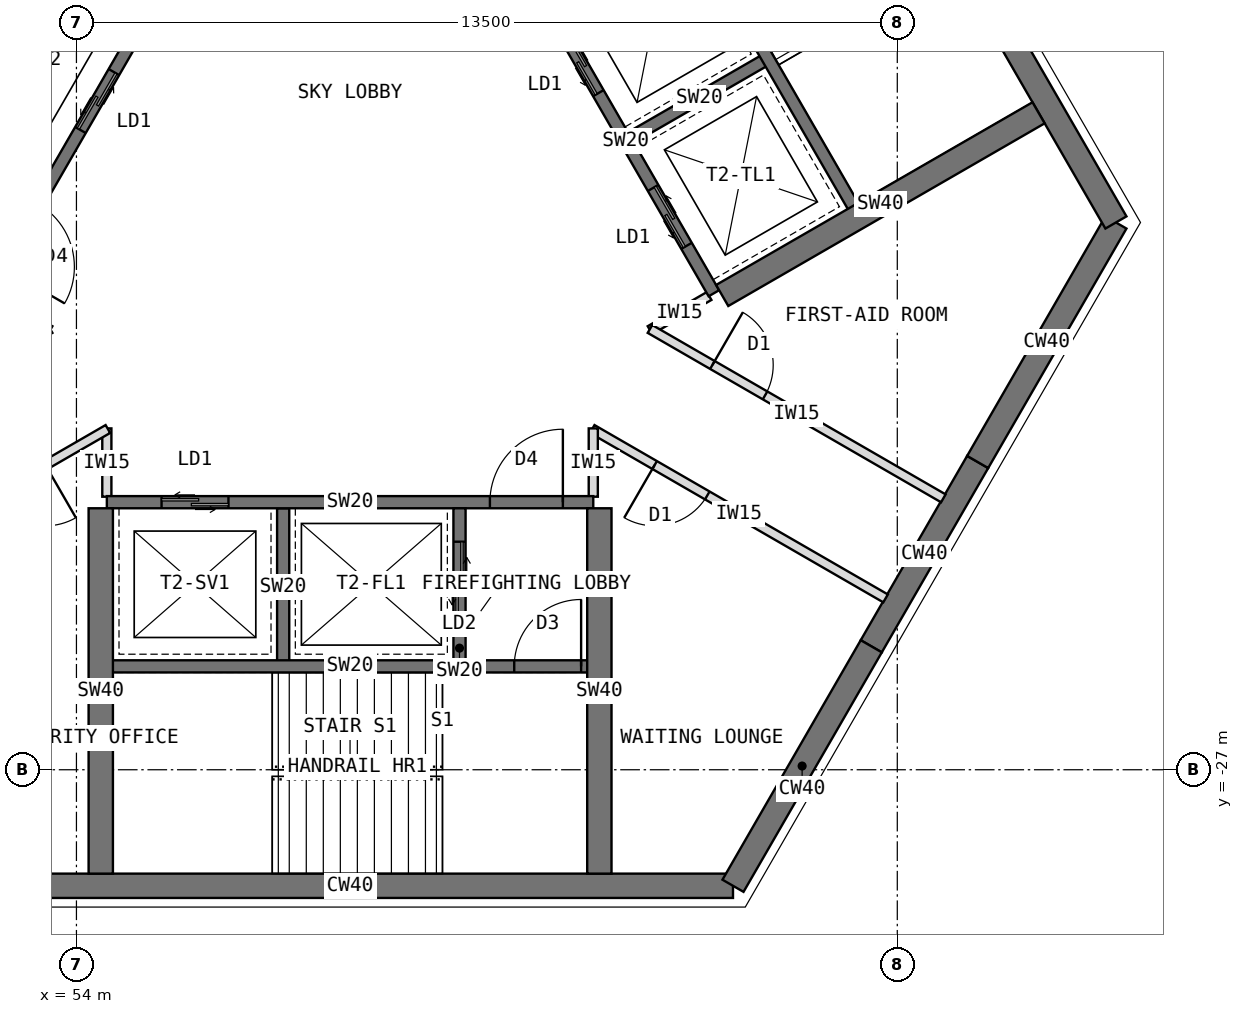
"""IFC4 building model, lengths in metres.
Left out: names, types, materials, properties, quantities, classifications, styles, units other than length and angle.
Written with IfcOpenShell. Run it as: python <this file> out.ifc"""

import sys

from ifc_helpers import new_model, si_unit, direction, frame, frame_2d, origin, place, context, subcontext, project, spatial, rectangle, extrude, element, fill, save


model = new_model("IFC4")
c1 = context("Model", 3, precision=1e-05, world=origin(), true_north=direction((0.0, 1.0)))
c2 = subcontext(c1, "Body", "Model", "MODEL_VIEW")
j1 = project(units=[si_unit("LENGTHUNIT", "METRE"), si_unit("PLANEANGLEUNIT", "RADIAN")], contexts=[c1])
p1 = place(None, origin())
s1 = spatial("IfcSite", under=j1, at=p1, CompositionType="ELEMENT")
p2 = place(p1, origin())
s2 = spatial("IfcBuilding", under=s1, at=p2, CompositionType="ELEMENT")
p3 = place(p2, frame((0.0, 0.0, 243.5)))
s3 = spatial("IfcBuildingStorey", under=s2, at=p3, CompositionType="ELEMENT", Elevation=243.5)
p4 = place(p3, frame((52.202, -28.908, 0.0), z_axis=(0.0, 0.0, 1.0), x_axis=(1.0, 0.0, 0.0)))
e1 = element("IfcWall", 1, at=p4, inside=s3, PredefinedType="SHEAR", context=c2, shape_type="SweptSolid", body=[
    extrude(rectangle(XDim=12.596, YDim=0.4, at=frame_2d((6.298, 0.0))), origin(), (0.0, 0.0, 1.0), 4.0),
])
p5 = place(p3, frame((64.798, -28.908, 0.0), z_axis=(0.0, 0.0, 1.0), x_axis=(0.499984222037, 0.866034513004, 0.0)))
e2 = element("IfcWall", 2, at=p5, inside=s3, PredefinedType="SHEAR", context=c2, shape_type="SweptSolid", body=[
    extrude(rectangle(XDim=4.548, YDim=0.4, at=frame_2d((2.274, 0.0))), origin(), (0.0, 0.0, 1.0), 4.0),
])
p6 = place(p3, frame((67.072, -24.97, 0.0), z_axis=(0.0, 0.0, 1.0), x_axis=(0.500010275428, 0.866019471182, 0.0)))
e3 = element("IfcWall", 3, at=p6, inside=s3, PredefinedType="SHEAR", context=c2, shape_type="SweptSolid", body=[
    extrude(rectangle(XDim=3.5, YDim=0.4, at=frame_2d((1.75, 0.0))), origin(), (0.0, 0.0, 1.0), 4.0),
])
p7 = place(p3, frame((68.822, -21.939, 0.0), z_axis=(0.0, 0.0, 1.0), x_axis=(0.500024481964, 0.866011268655, 0.0)))
e4 = element("IfcWall", 4, at=p7, inside=s3, PredefinedType="SHEAR", context=c2, shape_type="SweptSolid", body=[
    extrude(rectangle(XDim=4.548, YDim=0.4, at=frame_2d((2.274, 0.0))), origin(), (0.0, 0.0, 1.0), 4.0),
])
p8 = place(p3, frame((71.096, -18.0, 0.0), z_axis=(0.0, 0.0, 1.0), x_axis=(-0.500005998175, 0.866021940709, 0.0)))
e5 = element("IfcWall", 5, at=p8, inside=s3, PredefinedType="SHEAR", context=c2, shape_type="SweptSolid", body=[
    extrude(rectangle(XDim=12.596, YDim=0.4, at=frame_2d((6.298, 0.0))), origin(), (0.0, 0.0, 1.0), 4.0),
])
p9 = place(p3, frame((56.516, -12.236, 0.0), z_axis=(0.0, 0.0, 1.0), x_axis=(-0.49999894854, -0.866026010844, 0.0)))
e6 = element("IfcWall", 6, at=p9, inside=s3, PredefinedType="SHEAR", context=c2, shape_type="SweptSolid", body=[
    extrude(rectangle(XDim=8.0, YDim=0.2, at=frame_2d((4.0, 0.0))), origin(), (0.0, 0.0, 1.0), 4.0),
])
p10 = place(p9, frame((6.3, 0.0, 0.0)))
e7 = element("IfcOpeningElement", 7, at=p10, cuts=e6, PredefinedType="OPENING", context=c2, shape_type="SweptSolid", body=[
    extrude(rectangle(XDim=1.2, YDim=2.1, at=frame_2d((0.6, 1.05))), frame((0.0, 0.11, 0.0), z_axis=(0.0, -1.0, 0.0), x_axis=(1.0, 0.0, 0.0)), (0.0, 0.0, 1.0), 0.22),
])
p11 = place(p9, frame((0.9, 0.0, 0.0)))
e8 = element("IfcOpeningElement", 8, at=p11, cuts=e6, PredefinedType="OPENING", context=c2, shape_type="SweptSolid", body=[
    extrude(rectangle(XDim=1.1, YDim=2.2, at=frame_2d((0.55, 1.1))), frame((0.0, 0.11, 0.0), z_axis=(0.0, -1.0, 0.0), x_axis=(1.0, 0.0, 0.0)), (0.0, 0.0, 1.0), 0.22),
])
p12 = place(p9, frame((3.8, 0.0, 0.0)))
e9 = element("IfcOpeningElement", 9, at=p12, cuts=e6, PredefinedType="OPENING", context=c2, shape_type="SweptSolid", body=[
    extrude(rectangle(XDim=1.1, YDim=2.2, at=frame_2d((0.55, 1.1))), frame((0.0, 0.11, 0.0), z_axis=(0.0, -1.0, 0.0), x_axis=(1.0, 0.0, 0.0)), (0.0, 0.0, 1.0), 0.22),
])
p13 = place(p3, frame((54.178, -10.886, 0.0), z_axis=(0.0, 0.0, 1.0), x_axis=(-0.49999894854, -0.866026010844, 0.0)))
e10 = element("IfcWall", 10, at=p13, inside=s3, PredefinedType="SHEAR", context=c2, shape_type="SweptSolid", body=[
    extrude(rectangle(XDim=8.0, YDim=0.2, at=frame_2d((4.0, 0.0))), origin(), (0.0, 0.0, 1.0), 4.0),
])
p14 = place(p13, frame((6.8, 0.0, 0.0)))
e11 = element("IfcOpeningElement", 11, at=p14, cuts=e10, PredefinedType="OPENING", context=c2, shape_type="SweptSolid", body=[
    extrude(rectangle(XDim=0.9, YDim=2.1, at=frame_2d((0.45, 1.05))), frame((0.0, 0.11, 0.0), z_axis=(0.0, -1.0, 0.0), x_axis=(1.0, 0.0, 0.0)), (0.0, 0.0, 1.0), 0.22),
])
p15 = place(p3, frame((54.5, -22.6, 0.0), z_axis=(0.0, 0.0, 1.0), x_axis=(1.0, 0.0, 0.0)))
e12 = element("IfcWall", 12, at=p15, inside=s3, PredefinedType="SHEAR", context=c2, shape_type="SweptSolid", body=[
    extrude(rectangle(XDim=8.0, YDim=0.2, at=frame_2d((4.0, 0.0))), origin(), (0.0, 0.0, 1.0), 4.0),
])
p16 = place(p15, frame((6.3, 0.0, 0.0)))
e13 = element("IfcOpeningElement", 13, at=p16, cuts=e12, PredefinedType="OPENING", context=c2, shape_type="SweptSolid", body=[
    extrude(rectangle(XDim=1.2, YDim=2.1, at=frame_2d((0.6, 1.05))), frame((0.0, 0.11, 0.0), z_axis=(0.0, -1.0, 0.0), x_axis=(1.0, 0.0, 0.0)), (0.0, 0.0, 1.0), 0.22),
])
p17 = place(p15, frame((0.9, 0.0, 0.0)))
e14 = element("IfcOpeningElement", 14, at=p17, cuts=e12, PredefinedType="OPENING", context=c2, shape_type="SweptSolid", body=[
    extrude(rectangle(XDim=1.1, YDim=2.2, at=frame_2d((0.55, 1.1))), frame((0.0, 0.11, 0.0), z_axis=(0.0, -1.0, 0.0), x_axis=(1.0, 0.0, 0.0)), (0.0, 0.0, 1.0), 0.22),
])
p18 = place(p3, frame((57.4, -22.7, 0.0), z_axis=(0.0, 0.0, 1.0), x_axis=(0.0, -1.0, 0.0)))
e15 = element("IfcWall", 15, at=p18, inside=s3, PredefinedType="SHEAR", context=c2, shape_type="SweptSolid", body=[
    extrude(rectangle(XDim=2.6, YDim=0.2, at=frame_2d((1.3, 0.0))), origin(), (0.0, 0.0, 1.0), 4.0),
])
p19 = place(p3, frame((60.3, -22.7, 0.0), z_axis=(0.0, 0.0, 1.0), x_axis=(0.0, -1.0, 0.0)))
e16 = element("IfcWall", 16, at=p19, inside=s3, PredefinedType="SHEAR", context=c2, shape_type="SweptSolid", body=[
    extrude(rectangle(XDim=2.6, YDim=0.2, at=frame_2d((1.3, 0.0))), origin(), (0.0, 0.0, 1.0), 4.0),
])
p20 = place(p19, frame((0.55, 0.0, 0.0)))
e17 = element("IfcOpeningElement", 17, at=p20, cuts=e16, PredefinedType="OPENING", context=c2, shape_type="SweptSolid", body=[
    extrude(rectangle(XDim=1.3, YDim=2.2, at=frame_2d((0.65, 1.1))), frame((0.0, 0.11, 0.0), z_axis=(0.0, -1.0, 0.0), x_axis=(1.0, 0.0, 0.0)), (0.0, 0.0, 1.0), 0.22),
])
p21 = place(p3, frame((54.5, -25.3, 0.0), z_axis=(0.0, 0.0, 1.0), x_axis=(1.0, 0.0, 0.0)))
e18 = element("IfcWall", 18, at=p21, inside=s3, PredefinedType="SHEAR", context=c2, shape_type="SweptSolid", body=[
    extrude(rectangle(XDim=8.0, YDim=0.2, at=frame_2d((4.0, 0.0))), origin(), (0.0, 0.0, 1.0), 4.0),
])
p22 = place(p21, frame((6.7, 0.0, 0.0)))
e19 = element("IfcOpeningElement", 19, at=p22, cuts=e18, PredefinedType="OPENING", context=c2, shape_type="SweptSolid", body=[
    extrude(rectangle(XDim=1.1, YDim=2.1, at=frame_2d((0.55, 1.05))), frame((0.0, 0.11, 0.0), z_axis=(0.0, -1.0, 0.0), x_axis=(1.0, 0.0, 0.0)), (0.0, 0.0, 1.0), 0.22),
])
for number, where, z_axis, x_axis in (
    (20, (62.6, -22.7, 0.0), (0.0, 0.0, 1.0), (0.0, -1.0, 0.0)),
    (21, (54.4, -22.7, 0.0), (0.0, 0.0, 1.0), (0.0, -1.0, 0.0)),
):
    element("IfcWall", number, at=place(p3, frame(where, z_axis=z_axis, x_axis=x_axis)), inside=s3, PredefinedType="SHEAR", context=c2, shape_type="SweptSolid", body=[
        extrude(rectangle(XDim=6.008, YDim=0.4, at=frame_2d((3.004, 0.0))), origin(), (0.0, 0.0, 1.0), 4.0),
    ])
p23 = place(p3, frame((64.484, -19.164, 0.0), z_axis=(0.0, 0.0, 1.0), x_axis=(-0.49999894854, 0.866026010844, 0.0)))
e22 = element("IfcWall", 22, at=p23, inside=s3, PredefinedType="SHEAR", context=c2, shape_type="SweptSolid", body=[
    extrude(rectangle(XDim=8.0, YDim=0.2, at=frame_2d((4.0, 0.0))), origin(), (0.0, 0.0, 1.0), 4.0),
])
p24 = place(p23, frame((6.3, 0.0, 0.0)))
e23 = element("IfcOpeningElement", 23, at=p24, cuts=e22, PredefinedType="OPENING", context=c2, shape_type="SweptSolid", body=[
    extrude(rectangle(XDim=1.2, YDim=2.1, at=frame_2d((0.6, 1.05))), frame((0.0, 0.11, 0.0), z_axis=(0.0, -1.0, 0.0), x_axis=(1.0, 0.0, 0.0)), (0.0, 0.0, 1.0), 0.22),
])
p25 = place(p23, frame((0.9, 0.0, 0.0)))
e24 = element("IfcOpeningElement", 24, at=p25, cuts=e22, PredefinedType="OPENING", context=c2, shape_type="SweptSolid", body=[
    extrude(rectangle(XDim=1.1, YDim=2.2, at=frame_2d((0.55, 1.1))), frame((0.0, 0.11, 0.0), z_axis=(0.0, -1.0, 0.0), x_axis=(1.0, 0.0, 0.0)), (0.0, 0.0, 1.0), 0.22),
])
p26 = place(p23, frame((3.8, 0.0, 0.0)))
e25 = element("IfcOpeningElement", 25, at=p26, cuts=e22, PredefinedType="OPENING", context=c2, shape_type="SweptSolid", body=[
    extrude(rectangle(XDim=1.1, YDim=2.2, at=frame_2d((0.55, 1.1))), frame((0.0, 0.11, 0.0), z_axis=(0.0, -1.0, 0.0), x_axis=(1.0, 0.0, 0.0)), (0.0, 0.0, 1.0), 0.22),
])
p27 = place(p3, frame((63.12, -16.603, 0.0), z_axis=(0.0, 0.0, 1.0), x_axis=(0.866062058628, 0.499936506574, 0.0)))
e26 = element("IfcWall", 26, at=p27, inside=s3, PredefinedType="SHEAR", context=c2, shape_type="SweptSolid", body=[
    extrude(rectangle(XDim=2.6, YDim=0.2, at=frame_2d((1.3, 0.0))), origin(), (0.0, 0.0, 1.0), 4.0),
])
p28 = place(p3, frame((66.822, -17.814, 0.0), z_axis=(0.0, 0.0, 1.0), x_axis=(-0.49999894854, 0.866026010844, 0.0)))
e27 = element("IfcWall", 27, at=p28, inside=s3, PredefinedType="SHEAR", context=c2, shape_type="SweptSolid", body=[
    extrude(rectangle(XDim=8.0, YDim=0.2, at=frame_2d((4.0, 0.0))), origin(), (0.0, 0.0, 1.0), 4.0),
])
p29 = place(p28, frame((6.7, 0.0, 0.0)))
e28 = element("IfcOpeningElement", 28, at=p29, cuts=e27, PredefinedType="OPENING", context=c2, shape_type="SweptSolid", body=[
    extrude(rectangle(XDim=1.1, YDim=2.1, at=frame_2d((0.55, 1.05))), frame((0.0, 0.11, 0.0), z_axis=(0.0, -1.0, 0.0), x_axis=(1.0, 0.0, 0.0)), (0.0, 0.0, 1.0), 0.22),
])
p30 = place(p3, frame((64.62, -19.201, 0.0), z_axis=(0.0, 0.0, 1.0), x_axis=(0.866026570101, 0.499997979876, 0.0)))
e29 = element("IfcWall", 29, at=p30, inside=s3, PredefinedType="SHEAR", context=c2, shape_type="SweptSolid", body=[
    extrude(rectangle(XDim=6.008, YDim=0.4, at=frame_2d((3.004, 0.0))), origin(), (0.0, 0.0, 1.0), 4.0),
])
p31 = place(p3, frame((54.5, -22.51, 0.0), z_axis=(0.0, 0.0, 1.0), x_axis=(0.0, 1.0, 0.0)))
e30 = element("IfcWall", 30, at=p31, inside=s3, PredefinedType="PARTITIONING", context=c2, shape_type="SweptSolid", body=[
    extrude(rectangle(XDim=1.124, YDim=0.15, at=frame_2d((0.562, 0.0))), origin(), (0.0, 0.0, 1.0), 3.8),
])
p32 = place(p3, frame((54.517, -21.396, 0.0), z_axis=(0.0, 0.0, 1.0), x_axis=(-0.866036713669, -0.499980410194, 0.0)))
e31 = element("IfcWall", 31, at=p32, inside=s3, PredefinedType="PARTITIONING", context=c2, shape_type="SweptSolid", body=[
    extrude(rectangle(XDim=5.571, YDim=0.15, at=frame_2d((2.786, 0.0))), origin(), (0.0, 0.0, 1.0), 3.8),
])
p33 = place(p32, frame((1.186, 0.0, 0.0)))
e32 = element("IfcOpeningElement", 32, at=p33, cuts=e31, PredefinedType="OPENING", context=c2, shape_type="SweptSolid", body=[
    extrude(rectangle(XDim=1.0, YDim=2.1, at=frame_2d((0.5, 1.05))), frame((0.0, 0.085, 0.0), z_axis=(0.0, -1.0, 0.0), x_axis=(1.0, 0.0, 0.0)), (0.0, 0.0, 1.0), 0.17),
])
p34 = place(p3, frame((48.743, -22.536, 0.0), z_axis=(0.0, 0.0, 1.0), x_axis=(0.866036713669, 0.499980410194, 0.0)))
e33 = element("IfcWall", 33, at=p34, inside=s3, PredefinedType="PARTITIONING", context=c2, shape_type="SweptSolid", body=[
    extrude(rectangle(XDim=5.571, YDim=0.15, at=frame_2d((2.786, 0.0))), origin(), (0.0, 0.0, 1.0), 3.8),
])
p35 = place(p34, frame((3.385, 0.0, 0.0)))
e34 = element("IfcOpeningElement", 34, at=p35, cuts=e33, PredefinedType="OPENING", context=c2, shape_type="SweptSolid", body=[
    extrude(rectangle(XDim=1.0, YDim=2.1, at=frame_2d((0.5, 1.05))), frame((0.0, 0.085, 0.0), z_axis=(0.0, -1.0, 0.0), x_axis=(1.0, 0.0, 0.0)), (0.0, 0.0, 1.0), 0.17),
])
for number, where, z_axis, x_axis in (
    (35, (53.567, -19.771, 0.0), (0.0, 0.0, 1.0), (-0.866, 0.5, 0.0)),
    (36, (64.406, -19.209, 0.0), (0.0, 0.0, 1.0), (-0.866, -0.5, 0.0)),
):
    element("IfcWall", number, at=place(p3, frame(where, z_axis=z_axis, x_axis=x_axis)), inside=s3, PredefinedType="PARTITIONING", context=c2, shape_type="SweptSolid", body=[
        extrude(rectangle(XDim=1.124, YDim=0.15, at=frame_2d((0.562, 0.0))), origin(), (0.0, 0.0, 1.0), 3.8),
    ])
p36 = place(p3, frame((63.433, -19.751, 0.0), z_axis=(0.0, 0.0, 1.0), x_axis=(0.866036713669, -0.499980410194, 0.0)))
e37 = element("IfcWall", 37, at=p36, inside=s3, PredefinedType="PARTITIONING", context=c2, shape_type="SweptSolid", body=[
    extrude(rectangle(XDim=5.571, YDim=0.15, at=frame_2d((2.786, 0.0))), origin(), (0.0, 0.0, 1.0), 3.8),
])
p37 = place(p36, frame((1.186, 0.0, 0.0)))
e38 = element("IfcOpeningElement", 38, at=p37, cuts=e37, PredefinedType="OPENING", context=c2, shape_type="SweptSolid", body=[
    extrude(rectangle(XDim=1.0, YDim=2.1, at=frame_2d((0.5, 1.05))), frame((0.0, 0.085, 0.0), z_axis=(0.0, -1.0, 0.0), x_axis=(1.0, 0.0, 0.0)), (0.0, 0.0, 1.0), 0.17),
])
p38 = place(p3, frame((67.307, -24.182, 0.0), z_axis=(0.0, 0.0, 1.0), x_axis=(-0.866036713669, 0.499980410194, 0.0)))
e39 = element("IfcWall", 39, at=p38, inside=s3, PredefinedType="PARTITIONING", context=c2, shape_type="SweptSolid", body=[
    extrude(rectangle(XDim=5.571, YDim=0.15, at=frame_2d((2.786, 0.0))), origin(), (0.0, 0.0, 1.0), 3.8),
])
p39 = place(p38, frame((3.385, 0.0, 0.0)))
e40 = element("IfcOpeningElement", 40, at=p39, cuts=e39, PredefinedType="OPENING", context=c2, shape_type="SweptSolid", body=[
    extrude(rectangle(XDim=1.0, YDim=2.1, at=frame_2d((0.5, 1.05))), frame((0.0, 0.085, 0.0), z_axis=(0.0, -1.0, 0.0), x_axis=(1.0, 0.0, 0.0)), (0.0, 0.0, 1.0), 0.17),
])
p40 = place(p3, frame((62.5, -21.386, 0.0), z_axis=(0.0, 0.0, 1.0), x_axis=(0.0, -1.0, 0.0)))
e41 = element("IfcWall", 41, at=p40, inside=s3, PredefinedType="PARTITIONING", context=c2, shape_type="SweptSolid", body=[
    extrude(rectangle(XDim=1.124, YDim=0.15, at=frame_2d((0.562, 0.0))), origin(), (0.0, 0.0, 1.0), 3.8),
])
p41 = place(p12, origin())
e42 = element("IfcDoor", 42, at=p41, inside=s3, OperationType="DOUBLE_DOOR_SLIDING", PredefinedType="DOOR", context=c2, shape_type="SweptSolid", body=[
    extrude(rectangle(XDim=1.1, YDim=2.2, at=frame_2d((0.55, 1.1))), frame((0.0, 0.025, 0.0), z_axis=(0.0, -1.0, 0.0), x_axis=(1.0, 0.0, 0.0)), (0.0, 0.0, 1.0), 0.05),
])
fill(e9, e42)
p42 = place(p16, origin())
e43 = element("IfcDoor", 43, at=p42, inside=s3, OperationType="SINGLE_SWING_RIGHT", PredefinedType="DOOR", context=c2, shape_type="SweptSolid", body=[
    extrude(rectangle(XDim=1.2, YDim=2.1, at=frame_2d((0.6, 1.05))), frame((0.0, 0.025, 0.0), z_axis=(0.0, -1.0, 0.0), x_axis=(1.0, 0.0, 0.0)), (0.0, 0.0, 1.0), 0.05),
])
fill(e13, e43)
p43 = place(p20, origin())
e44 = element("IfcDoor", 44, at=p43, inside=s3, OperationType="DOUBLE_DOOR_SLIDING", PredefinedType="DOOR", context=c2, shape_type="SweptSolid", body=[
    extrude(rectangle(XDim=1.3, YDim=2.2, at=frame_2d((0.65, 1.1))), frame((0.0, 0.025, 0.0), z_axis=(0.0, -1.0, 0.0), x_axis=(1.0, 0.0, 0.0)), (0.0, 0.0, 1.0), 0.05),
])
fill(e17, e44)
p44 = place(p17, origin())
e45 = element("IfcDoor", 45, at=p44, inside=s3, OperationType="DOUBLE_DOOR_SLIDING", PredefinedType="DOOR", context=c2, shape_type="SweptSolid", body=[
    extrude(rectangle(XDim=1.1, YDim=2.2, at=frame_2d((0.55, 1.1))), frame((0.0, 0.025, 0.0), z_axis=(0.0, -1.0, 0.0), x_axis=(1.0, 0.0, 0.0)), (0.0, 0.0, 1.0), 0.05),
])
fill(e14, e45)
p45 = place(p22, origin())
e46 = element("IfcDoor", 46, at=p45, inside=s3, OperationType="SINGLE_SWING_RIGHT", PredefinedType="DOOR", context=c2, shape_type="SweptSolid", body=[
    extrude(rectangle(XDim=1.1, YDim=2.1, at=frame_2d((0.55, 1.05))), frame((0.0, 0.025, 0.0), z_axis=(0.0, -1.0, 0.0), x_axis=(1.0, 0.0, 0.0)), (0.0, 0.0, 1.0), 0.05),
])
fill(e19, e46)
p46 = place(p25, origin())
e47 = element("IfcDoor", 47, at=p46, inside=s3, OperationType="DOUBLE_DOOR_SLIDING", PredefinedType="DOOR", context=c2, shape_type="SweptSolid", body=[
    extrude(rectangle(XDim=1.1, YDim=2.2, at=frame_2d((0.55, 1.1))), frame((0.0, 0.025, 0.0), z_axis=(0.0, -1.0, 0.0), x_axis=(1.0, 0.0, 0.0)), (0.0, 0.0, 1.0), 0.05),
])
fill(e24, e47)
p47 = place(p26, origin())
e48 = element("IfcDoor", 48, at=p47, inside=s3, OperationType="DOUBLE_DOOR_SLIDING", PredefinedType="DOOR", context=c2, shape_type="SweptSolid", body=[
    extrude(rectangle(XDim=1.1, YDim=2.2, at=frame_2d((0.55, 1.1))), frame((0.0, 0.025, 0.0), z_axis=(0.0, -1.0, 0.0), x_axis=(1.0, 0.0, 0.0)), (0.0, 0.0, 1.0), 0.05),
])
fill(e25, e48)
p48 = place(p39, origin())
e49 = element("IfcDoor", 49, at=p48, inside=s3, OperationType="SINGLE_SWING_RIGHT", PredefinedType="DOOR", context=c2, shape_type="SweptSolid", body=[
    extrude(rectangle(XDim=1.0, YDim=2.1, at=frame_2d((0.5, 1.05))), frame((0.0, 0.025, 0.0), z_axis=(0.0, -1.0, 0.0), x_axis=(1.0, 0.0, 0.0)), (0.0, 0.0, 1.0), 0.05),
])
fill(e40, e49)
p49 = place(p37, origin())
e50 = element("IfcDoor", 50, at=p49, inside=s3, OperationType="SINGLE_SWING_LEFT", PredefinedType="DOOR", context=c2, shape_type="SweptSolid", body=[
    extrude(rectangle(XDim=1.0, YDim=2.1, at=frame_2d((0.5, 1.05))), frame((0.0, 0.025, 0.0), z_axis=(0.0, -1.0, 0.0), x_axis=(1.0, 0.0, 0.0)), (0.0, 0.0, 1.0), 0.05),
])
fill(e38, e50)
save(model, sys.argv[1])
